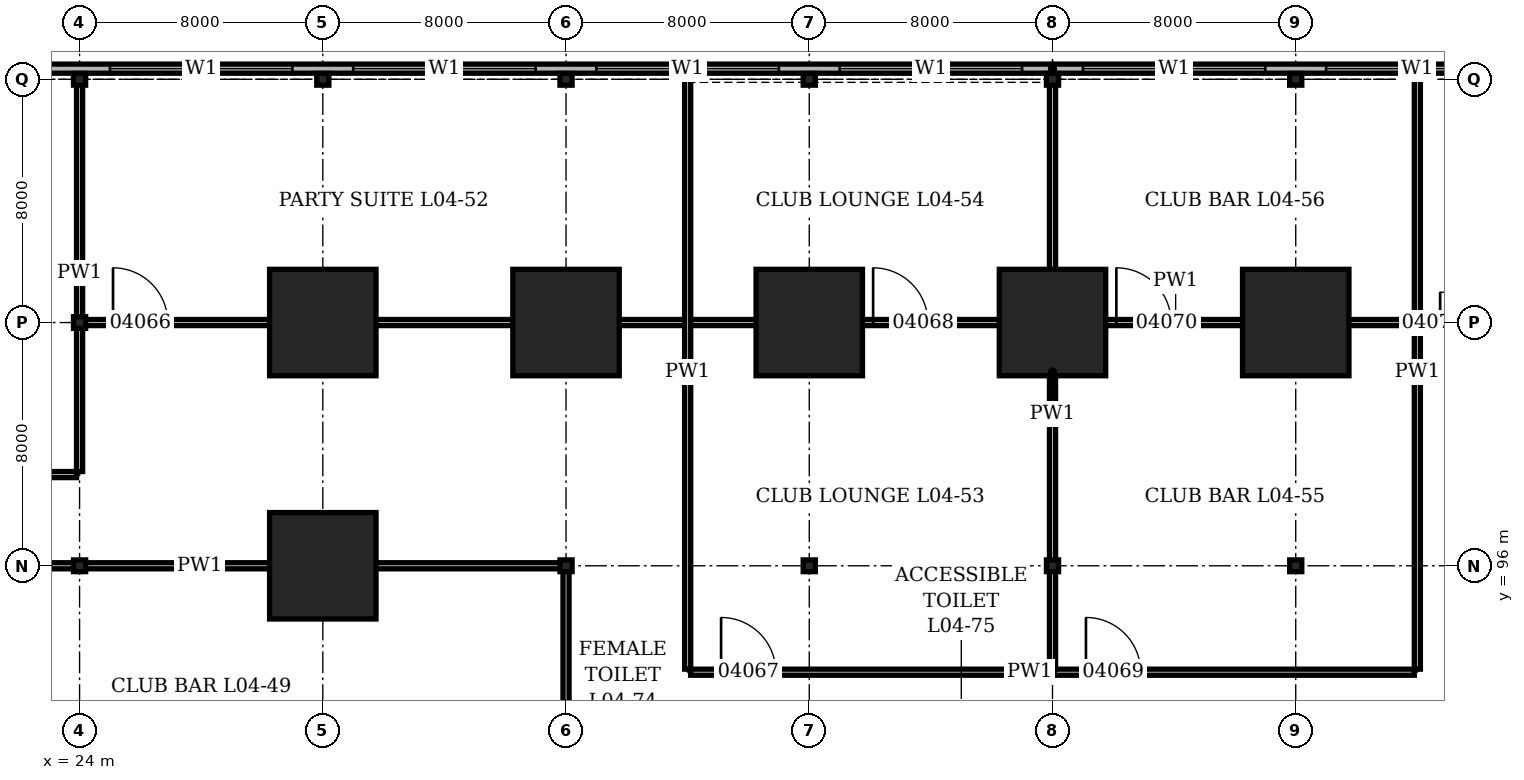
"""IFC4 building model, lengths in metres.
Left out: names, types, materials, properties, quantities, classifications, styles, units other than length and angle.
Written with IfcOpenShell. Run it as: python <this file> out.ifc"""

import sys

from ifc_helpers import new_model, si_unit, direction, frame, frame_2d, origin, origin_2d, place, context, subcontext, project, spatial, rectangle, hollow_rectangle, i_section, extrude, element, fill, save


model = new_model("IFC4")
c1 = context("Model", 3, precision=1e-05, world=origin(), true_north=direction((0.0, 1.0)))
c2 = subcontext(c1, "Body", "Model", "MODEL_VIEW")
j1 = project(units=[si_unit("LENGTHUNIT", "METRE"), si_unit("PLANEANGLEUNIT", "RADIAN")], contexts=[c1])
p1 = place(None, origin())
s1 = spatial("IfcSite", under=j1, at=p1, CompositionType="ELEMENT")
p2 = place(p1, origin())
s2 = spatial("IfcBuilding", under=s1, at=p2, CompositionType="ELEMENT")
p3 = place(p2, frame((0.0, 0.0, 19.9)))
s3 = spatial("IfcBuildingStorey", under=s2, at=p3, CompositionType="ELEMENT", Elevation=19.9)
for number, where, z_axis, x_axis in (
    (1, (24.0, 96.0, 0.0), (0.0, 0.0, 1.0), (1.0, 0.0, 0.0)),
    (2, (24.0, 104.0, 0.0), (0.0, 0.0, 1.0), (1.0, 0.0, 0.0)),
    (3, (24.0, 112.0, 0.0), (0.0, 0.0, 1.0), (1.0, 0.0, 0.0)),
):
    element("IfcColumn", number, at=place(p3, frame(where, z_axis=z_axis, x_axis=x_axis)), inside=s3, PredefinedType="COLUMN", context=c2, shape_type="SweptSolid", body=[
        extrude(i_section(OverallWidth=0.399, OverallDepth=0.386, WebThickness=0.021, FlangeThickness=0.033, at=origin_2d()), origin(), (0.0, 0.0, 1.0), 6.0),
    ])
for number, where, z_axis, x_axis in (
    (4, (32.0, 96.0, 0.0), (0.0, 0.0, 1.0), (1.0, 0.0, 0.0)),
    (5, (32.0, 104.0, 0.0), (0.0, 0.0, 1.0), (1.0, 0.0, 0.0)),
):
    element("IfcColumn", number, at=place(p3, frame(where, z_axis=z_axis, x_axis=x_axis)), inside=s3, PredefinedType="COLUMN", context=c2, shape_type="SweptSolid", body=[
        extrude(hollow_rectangle(XDim=3.5, YDim=3.5, WallThickness=0.5, at=origin_2d()), origin(), (0.0, 0.0, 1.0), 6.0),
    ])
for number, where, z_axis, x_axis in (
    (6, (32.0, 112.0, 0.0), (0.0, 0.0, 1.0), (1.0, 0.0, 0.0)),
    (7, (40.0, 96.0, 0.0), (0.0, 0.0, 1.0), (1.0, 0.0, 0.0)),
):
    element("IfcColumn", number, at=place(p3, frame(where, z_axis=z_axis, x_axis=x_axis)), inside=s3, PredefinedType="COLUMN", context=c2, shape_type="SweptSolid", body=[
        extrude(i_section(OverallWidth=0.399, OverallDepth=0.386, WebThickness=0.021, FlangeThickness=0.033, at=origin_2d()), origin(), (0.0, 0.0, 1.0), 6.0),
    ])
p4 = place(p3, frame((40.0, 104.0, 0.0), z_axis=(0.0, 0.0, 1.0), x_axis=(1.0, 0.0, 0.0)))
e8 = element("IfcColumn", 8, at=p4, inside=s3, PredefinedType="COLUMN", context=c2, shape_type="SweptSolid", body=[
    extrude(hollow_rectangle(XDim=3.5, YDim=3.5, WallThickness=0.5, at=origin_2d()), origin(), (0.0, 0.0, 1.0), 6.0),
])
for number, where, z_axis, x_axis in (
    (9, (40.0, 112.0, 0.0), (0.0, 0.0, 1.0), (1.0, 0.0, 0.0)),
    (10, (48.0, 96.0, 0.0), (0.0, 0.0, 1.0), (1.0, 0.0, 0.0)),
):
    element("IfcColumn", number, at=place(p3, frame(where, z_axis=z_axis, x_axis=x_axis)), inside=s3, PredefinedType="COLUMN", context=c2, shape_type="SweptSolid", body=[
        extrude(i_section(OverallWidth=0.399, OverallDepth=0.386, WebThickness=0.021, FlangeThickness=0.033, at=origin_2d()), origin(), (0.0, 0.0, 1.0), 6.0),
    ])
p5 = place(p3, frame((48.0, 104.0, 0.0), z_axis=(0.0, 0.0, 1.0), x_axis=(1.0, 0.0, 0.0)))
e11 = element("IfcColumn", 11, at=p5, inside=s3, PredefinedType="COLUMN", context=c2, shape_type="SweptSolid", body=[
    extrude(hollow_rectangle(XDim=3.5, YDim=3.5, WallThickness=0.5, at=origin_2d()), origin(), (0.0, 0.0, 1.0), 6.0),
])
for number, where, z_axis, x_axis in (
    (12, (48.0, 112.0, 0.0), (0.0, 0.0, 1.0), (1.0, 0.0, 0.0)),
    (13, (56.0, 96.0, 0.0), (0.0, 0.0, 1.0), (1.0, 0.0, 0.0)),
):
    element("IfcColumn", number, at=place(p3, frame(where, z_axis=z_axis, x_axis=x_axis)), inside=s3, PredefinedType="COLUMN", context=c2, shape_type="SweptSolid", body=[
        extrude(i_section(OverallWidth=0.399, OverallDepth=0.386, WebThickness=0.021, FlangeThickness=0.033, at=origin_2d()), origin(), (0.0, 0.0, 1.0), 6.0),
    ])
p6 = place(p3, frame((56.0, 104.0, 0.0), z_axis=(0.0, 0.0, 1.0), x_axis=(1.0, 0.0, 0.0)))
e14 = element("IfcColumn", 14, at=p6, inside=s3, PredefinedType="COLUMN", context=c2, shape_type="SweptSolid", body=[
    extrude(hollow_rectangle(XDim=3.5, YDim=3.5, WallThickness=0.5, at=origin_2d()), origin(), (0.0, 0.0, 1.0), 6.0),
])
for number, where, z_axis, x_axis in (
    (15, (56.0, 112.0, 0.0), (0.0, 0.0, 1.0), (1.0, 0.0, 0.0)),
    (16, (64.0, 96.0, 0.0), (0.0, 0.0, 1.0), (1.0, 0.0, 0.0)),
):
    element("IfcColumn", number, at=place(p3, frame(where, z_axis=z_axis, x_axis=x_axis)), inside=s3, PredefinedType="COLUMN", context=c2, shape_type="SweptSolid", body=[
        extrude(i_section(OverallWidth=0.399, OverallDepth=0.386, WebThickness=0.021, FlangeThickness=0.033, at=origin_2d()), origin(), (0.0, 0.0, 1.0), 6.0),
    ])
p7 = place(p3, frame((64.0, 104.0, 0.0), z_axis=(0.0, 0.0, 1.0), x_axis=(1.0, 0.0, 0.0)))
e17 = element("IfcColumn", 17, at=p7, inside=s3, PredefinedType="COLUMN", context=c2, shape_type="SweptSolid", body=[
    extrude(hollow_rectangle(XDim=3.5, YDim=3.5, WallThickness=0.5, at=origin_2d()), origin(), (0.0, 0.0, 1.0), 6.0),
])
p8 = place(p3, frame((64.0, 112.0, 0.0), z_axis=(0.0, 0.0, 1.0), x_axis=(1.0, 0.0, 0.0)))
e18 = element("IfcColumn", 18, at=p8, inside=s3, PredefinedType="COLUMN", context=c2, shape_type="SweptSolid", body=[
    extrude(i_section(OverallWidth=0.399, OverallDepth=0.386, WebThickness=0.021, FlangeThickness=0.033, at=origin_2d()), origin(), (0.0, 0.0, 1.0), 6.0),
])
p9 = place(p3, frame((112.35, 112.35, 0.0), z_axis=(0.0, 0.0, 1.0), x_axis=(-1.0, 0.0, 0.0)))
e19 = element("IfcWall", 19, at=p9, inside=s3, PredefinedType="SOLIDWALL", context=c2, shape_type="SweptSolid", body=[
    extrude(rectangle(XDim=112.7, YDim=0.3, at=frame_2d((56.35, 0.0))), origin(), (0.0, 0.0, 1.0), 6.0),
])
p10 = place(p9, frame((1.35, 0.0, 1.0)))
e20 = element("IfcOpeningElement", 20, at=p10, cuts=e19, PredefinedType="OPENING", context=c2, shape_type="SweptSolid", body=[
    extrude(rectangle(XDim=6.0, YDim=1.5, at=frame_2d((3.0, 0.75))), frame((0.0, 0.16, 0.0), z_axis=(0.0, -1.0, 0.0), x_axis=(1.0, 0.0, 0.0)), (0.0, 0.0, 1.0), 0.32),
])
p11 = place(p9, frame((9.35, 0.0, 1.0)))
e21 = element("IfcOpeningElement", 21, at=p11, cuts=e19, PredefinedType="OPENING", context=c2, shape_type="SweptSolid", body=[
    extrude(rectangle(XDim=6.0, YDim=1.5, at=frame_2d((3.0, 0.75))), frame((0.0, 0.16, 0.0), z_axis=(0.0, -1.0, 0.0), x_axis=(1.0, 0.0, 0.0)), (0.0, 0.0, 1.0), 0.32),
])
p12 = place(p9, frame((17.35, 0.0, 1.0)))
e22 = element("IfcOpeningElement", 22, at=p12, cuts=e19, PredefinedType="OPENING", context=c2, shape_type="SweptSolid", body=[
    extrude(rectangle(XDim=6.0, YDim=1.5, at=frame_2d((3.0, 0.75))), frame((0.0, 0.16, 0.0), z_axis=(0.0, -1.0, 0.0), x_axis=(1.0, 0.0, 0.0)), (0.0, 0.0, 1.0), 0.32),
])
p13 = place(p9, frame((25.35, 0.0, 1.0)))
e23 = element("IfcOpeningElement", 23, at=p13, cuts=e19, PredefinedType="OPENING", context=c2, shape_type="SweptSolid", body=[
    extrude(rectangle(XDim=6.0, YDim=1.5, at=frame_2d((3.0, 0.75))), frame((0.0, 0.16, 0.0), z_axis=(0.0, -1.0, 0.0), x_axis=(1.0, 0.0, 0.0)), (0.0, 0.0, 1.0), 0.32),
])
p14 = place(p9, frame((33.35, 0.0, 1.0)))
e24 = element("IfcOpeningElement", 24, at=p14, cuts=e19, PredefinedType="OPENING", context=c2, shape_type="SweptSolid", body=[
    extrude(rectangle(XDim=6.0, YDim=1.5, at=frame_2d((3.0, 0.75))), frame((0.0, 0.16, 0.0), z_axis=(0.0, -1.0, 0.0), x_axis=(1.0, 0.0, 0.0)), (0.0, 0.0, 1.0), 0.32),
])
p15 = place(p9, frame((41.35, 0.0, 1.0)))
e25 = element("IfcOpeningElement", 25, at=p15, cuts=e19, PredefinedType="OPENING", context=c2, shape_type="SweptSolid", body=[
    extrude(rectangle(XDim=6.0, YDim=1.5, at=frame_2d((3.0, 0.75))), frame((0.0, 0.16, 0.0), z_axis=(0.0, -1.0, 0.0), x_axis=(1.0, 0.0, 0.0)), (0.0, 0.0, 1.0), 0.32),
])
p16 = place(p9, frame((49.35, 0.0, 1.0)))
e26 = element("IfcOpeningElement", 26, at=p16, cuts=e19, PredefinedType="OPENING", context=c2, shape_type="SweptSolid", body=[
    extrude(rectangle(XDim=6.0, YDim=1.5, at=frame_2d((3.0, 0.75))), frame((0.0, 0.16, 0.0), z_axis=(0.0, -1.0, 0.0), x_axis=(1.0, 0.0, 0.0)), (0.0, 0.0, 1.0), 0.32),
])
p17 = place(p9, frame((57.35, 0.0, 1.0)))
e27 = element("IfcOpeningElement", 27, at=p17, cuts=e19, PredefinedType="OPENING", context=c2, shape_type="SweptSolid", body=[
    extrude(rectangle(XDim=6.0, YDim=1.5, at=frame_2d((3.0, 0.75))), frame((0.0, 0.16, 0.0), z_axis=(0.0, -1.0, 0.0), x_axis=(1.0, 0.0, 0.0)), (0.0, 0.0, 1.0), 0.32),
])
p18 = place(p9, frame((65.35, 0.0, 1.0)))
e28 = element("IfcOpeningElement", 28, at=p18, cuts=e19, PredefinedType="OPENING", context=c2, shape_type="SweptSolid", body=[
    extrude(rectangle(XDim=6.0, YDim=1.5, at=frame_2d((3.0, 0.75))), frame((0.0, 0.16, 0.0), z_axis=(0.0, -1.0, 0.0), x_axis=(1.0, 0.0, 0.0)), (0.0, 0.0, 1.0), 0.32),
])
p19 = place(p9, frame((73.35, 0.0, 1.0)))
e29 = element("IfcOpeningElement", 29, at=p19, cuts=e19, PredefinedType="OPENING", context=c2, shape_type="SweptSolid", body=[
    extrude(rectangle(XDim=6.0, YDim=1.5, at=frame_2d((3.0, 0.75))), frame((0.0, 0.16, 0.0), z_axis=(0.0, -1.0, 0.0), x_axis=(1.0, 0.0, 0.0)), (0.0, 0.0, 1.0), 0.32),
])
p20 = place(p9, frame((81.35, 0.0, 1.0)))
e30 = element("IfcOpeningElement", 30, at=p20, cuts=e19, PredefinedType="OPENING", context=c2, shape_type="SweptSolid", body=[
    extrude(rectangle(XDim=6.0, YDim=1.5, at=frame_2d((3.0, 0.75))), frame((0.0, 0.16, 0.0), z_axis=(0.0, -1.0, 0.0), x_axis=(1.0, 0.0, 0.0)), (0.0, 0.0, 1.0), 0.32),
])
p21 = place(p9, frame((89.35, 0.0, 1.0)))
e31 = element("IfcOpeningElement", 31, at=p21, cuts=e19, PredefinedType="OPENING", context=c2, shape_type="SweptSolid", body=[
    extrude(rectangle(XDim=6.0, YDim=1.5, at=frame_2d((3.0, 0.75))), frame((0.0, 0.16, 0.0), z_axis=(0.0, -1.0, 0.0), x_axis=(1.0, 0.0, 0.0)), (0.0, 0.0, 1.0), 0.32),
])
p22 = place(p9, frame((97.35, 0.0, 1.0)))
e32 = element("IfcOpeningElement", 32, at=p22, cuts=e19, PredefinedType="OPENING", context=c2, shape_type="SweptSolid", body=[
    extrude(rectangle(XDim=6.0, YDim=1.5, at=frame_2d((3.0, 0.75))), frame((0.0, 0.16, 0.0), z_axis=(0.0, -1.0, 0.0), x_axis=(1.0, 0.0, 0.0)), (0.0, 0.0, 1.0), 0.32),
])
p23 = place(p9, frame((105.35, 0.0, 1.0)))
e33 = element("IfcOpeningElement", 33, at=p23, cuts=e19, PredefinedType="OPENING", context=c2, shape_type="SweptSolid", body=[
    extrude(rectangle(XDim=6.0, YDim=1.5, at=frame_2d((3.0, 0.75))), frame((0.0, 0.16, 0.0), z_axis=(0.0, -1.0, 0.0), x_axis=(1.0, 0.0, 0.0)), (0.0, 0.0, 1.0), 0.32),
])
p24 = place(p3, frame((44.1, 92.5, 0.0), z_axis=(0.0, 0.0, 1.0), x_axis=(1.0, 0.0, 0.0)))
e34 = element("IfcWall", 34, at=p24, inside=s3, PredefinedType="PARTITIONING", context=c2, shape_type="SweptSolid", body=[
    extrude(rectangle(XDim=23.8, YDim=0.2, at=frame_2d((11.9, 0.0))), origin(), (0.0, 0.0, 1.0), 5.75),
])
p25 = place(p24, frame((1.0, 0.0, 0.0)))
e35 = element("IfcOpeningElement", 35, at=p25, cuts=e34, PredefinedType="OPENING", context=c2, shape_type="SweptSolid", body=[
    extrude(rectangle(XDim=1.8, YDim=2.4, at=frame_2d((0.9, 1.2))), frame((0.0, 0.11, 0.0), z_axis=(0.0, -1.0, 0.0), x_axis=(1.0, 0.0, 0.0)), (0.0, 0.0, 1.0), 0.22),
])
p26 = place(p24, frame((13.0, 0.0, 0.0)))
e36 = element("IfcOpeningElement", 36, at=p26, cuts=e34, PredefinedType="OPENING", context=c2, shape_type="SweptSolid", body=[
    extrude(rectangle(XDim=1.8, YDim=2.4, at=frame_2d((0.9, 1.2))), frame((0.0, 0.11, 0.0), z_axis=(0.0, -1.0, 0.0), x_axis=(1.0, 0.0, 0.0)), (0.0, 0.0, 1.0), 0.22),
])
p27 = place(p3, frame((16.0, 96.0, 0.0), z_axis=(0.0, 0.0, 1.0), x_axis=(1.0, 0.0, 0.0)))
e37 = element("IfcWall", 37, at=p27, inside=s3, PredefinedType="PARTITIONING", context=c2, shape_type="SweptSolid", body=[
    extrude(rectangle(XDim=23.9, YDim=0.2, at=frame_2d((11.95, 0.0))), origin(), (0.0, 0.0, 1.0), 4.978),
])
p28 = place(p3, frame((12.95, 99.0, 0.0), z_axis=(0.0, 0.0, 1.0), x_axis=(1.0, 0.0, 0.0)))
e38 = element("IfcWall", 38, at=p28, inside=s3, PredefinedType="PARTITIONING", context=c2, shape_type="SweptSolid", body=[
    extrude(rectangle(XDim=10.95, YDim=0.2, at=frame_2d((5.475, 0.0))), origin(), (0.0, 0.0, 1.0), 5.75),
])
p29 = place(p28, frame((1.0, 0.0, 0.0)))
e39 = element("IfcOpeningElement", 39, at=p29, cuts=e38, PredefinedType="OPENING", context=c2, shape_type="SweptSolid", body=[
    extrude(rectangle(XDim=1.8, YDim=2.4, at=frame_2d((0.9, 1.2))), frame((0.0, 0.11, 0.0), z_axis=(0.0, -1.0, 0.0), x_axis=(1.0, 0.0, 0.0)), (0.0, 0.0, 1.0), 0.22),
])
p30 = place(p3, frame((24.1, 104.0, 0.0), z_axis=(0.0, 0.0, 1.0), x_axis=(1.0, 0.0, 0.0)))
e40 = element("IfcWall", 40, at=p30, inside=s3, PredefinedType="PARTITIONING", context=c2, shape_type="SweptSolid", body=[
    extrude(rectangle(XDim=71.9, YDim=0.2, at=frame_2d((35.95, 0.0))), origin(), (0.0, 0.0, 1.0), 4.978),
])
p31 = place(p30, frame((1.0, 0.0, 0.0)))
e41 = element("IfcOpeningElement", 41, at=p31, cuts=e40, PredefinedType="OPENING", context=c2, shape_type="SweptSolid", body=[
    extrude(rectangle(XDim=1.8, YDim=2.4, at=frame_2d((0.9, 1.2))), frame((0.0, 0.11, 0.0), z_axis=(0.0, -1.0, 0.0), x_axis=(1.0, 0.0, 0.0)), (0.0, 0.0, 1.0), 0.22),
])
p32 = place(p30, frame((26.0, 0.0, 0.0)))
e42 = element("IfcOpeningElement", 42, at=p32, cuts=e40, PredefinedType="OPENING", context=c2, shape_type="SweptSolid", body=[
    extrude(rectangle(XDim=1.8, YDim=2.4, at=frame_2d((0.9, 1.2))), frame((0.0, 0.11, 0.0), z_axis=(0.0, -1.0, 0.0), x_axis=(1.0, 0.0, 0.0)), (0.0, 0.0, 1.0), 0.22),
])
p33 = place(p30, frame((34.0, 0.0, 0.0)))
e43 = element("IfcOpeningElement", 43, at=p33, cuts=e40, PredefinedType="OPENING", context=c2, shape_type="SweptSolid", body=[
    extrude(rectangle(XDim=1.8, YDim=2.4, at=frame_2d((0.9, 1.2))), frame((0.0, 0.11, 0.0), z_axis=(0.0, -1.0, 0.0), x_axis=(1.0, 0.0, 0.0)), (0.0, 0.0, 1.0), 0.22),
])
p34 = place(p30, frame((44.65, 0.0, 0.0)))
e44 = element("IfcOpeningElement", 44, at=p34, cuts=e40, PredefinedType="OPENING", context=c2, shape_type="SweptSolid", body=[
    extrude(rectangle(XDim=1.0, YDim=2.1, at=frame_2d((0.5, 1.05))), frame((0.0, 0.11, 0.0), z_axis=(0.0, -1.0, 0.0), x_axis=(1.0, 0.0, 0.0)), (0.0, 0.0, 1.0), 0.22),
])
p35 = place(p3, frame((24.0, 99.1, 0.0), z_axis=(0.0, 0.0, 1.0), x_axis=(0.0, 1.0, 0.0)))
e45 = element("IfcWall", 45, at=p35, inside=s3, PredefinedType="PARTITIONING", context=c2, shape_type="SweptSolid", body=[
    extrude(rectangle(XDim=13.05, YDim=0.2, at=frame_2d((6.525, 0.0))), origin(), (0.0, 0.0, 1.0), 4.978),
])
p36 = place(p3, frame((40.0, 72.1, 0.0), z_axis=(0.0, 0.0, 1.0), x_axis=(0.0, 1.0, 0.0)))
e46 = element("IfcWall", 46, at=p36, inside=s3, PredefinedType="PARTITIONING", context=c2, shape_type="SweptSolid", body=[
    extrude(rectangle(XDim=23.8, YDim=0.2, at=frame_2d((11.9, 0.0))), origin(), (0.0, 0.0, 1.0), 4.978),
])
p37 = place(p36, frame((17.0, 0.0, 0.0)))
e47 = element("IfcOpeningElement", 47, at=p37, cuts=e46, PredefinedType="OPENING", context=c2, shape_type="SweptSolid", body=[
    extrude(rectangle(XDim=1.8, YDim=2.4, at=frame_2d((0.9, 1.2))), frame((0.0, 0.11, 0.0), z_axis=(0.0, -1.0, 0.0), x_axis=(1.0, 0.0, 0.0)), (0.0, 0.0, 1.0), 0.22),
])
p38 = place(p3, frame((44.0, 92.6, 0.0), z_axis=(0.0, 0.0, 1.0), x_axis=(0.0, 1.0, 0.0)))
e48 = element("IfcWall", 48, at=p38, inside=s3, PredefinedType="PARTITIONING", context=c2, shape_type="SweptSolid", body=[
    extrude(rectangle(XDim=19.55, YDim=0.2, at=frame_2d((9.775, 0.0))), origin(), (0.0, 0.0, 1.0), 5.75),
])
p39 = place(p3, frame((56.0, 92.6, 0.0), z_axis=(0.0, 0.0, 1.0), x_axis=(0.0, 1.0, 0.0)))
e49 = element("IfcWall", 49, at=p39, inside=s3, PredefinedType="PARTITIONING", context=c2, shape_type="SweptSolid", body=[
    extrude(rectangle(XDim=19.55, YDim=0.2, at=frame_2d((9.775, 0.0))), origin(), (0.0, 0.0, 1.0), 4.978),
])
p40 = place(p3, frame((68.0, 92.6, 0.0), z_axis=(0.0, 0.0, 1.0), x_axis=(0.0, 1.0, 0.0)))
e50 = element("IfcWall", 50, at=p40, inside=s3, PredefinedType="PARTITIONING", context=c2, shape_type="SweptSolid", body=[
    extrude(rectangle(XDim=19.55, YDim=0.2, at=frame_2d((9.775, 0.0))), origin(), (0.0, 0.0, 1.0), 5.75),
])
p41 = place(p15, origin())
e51 = element("IfcWindow", 51, at=p41, inside=s3, PartitioningType="SINGLE_PANEL", PredefinedType="WINDOW", context=c2, shape_type="SweptSolid", body=[
    extrude(rectangle(XDim=6.0, YDim=1.5, at=frame_2d((3.0, 0.75))), frame((0.0, 0.03, 0.0), z_axis=(0.0, -1.0, 0.0), x_axis=(1.0, 0.0, 0.0)), (0.0, 0.0, 1.0), 0.06),
])
fill(e25, e51)
p42 = place(p16, origin())
e52 = element("IfcWindow", 52, at=p42, inside=s3, PartitioningType="SINGLE_PANEL", PredefinedType="WINDOW", context=c2, shape_type="SweptSolid", body=[
    extrude(rectangle(XDim=6.0, YDim=1.5, at=frame_2d((3.0, 0.75))), frame((0.0, 0.03, 0.0), z_axis=(0.0, -1.0, 0.0), x_axis=(1.0, 0.0, 0.0)), (0.0, 0.0, 1.0), 0.06),
])
fill(e26, e52)
p43 = place(p17, origin())
e53 = element("IfcWindow", 53, at=p43, inside=s3, PartitioningType="SINGLE_PANEL", PredefinedType="WINDOW", context=c2, shape_type="SweptSolid", body=[
    extrude(rectangle(XDim=6.0, YDim=1.5, at=frame_2d((3.0, 0.75))), frame((0.0, 0.03, 0.0), z_axis=(0.0, -1.0, 0.0), x_axis=(1.0, 0.0, 0.0)), (0.0, 0.0, 1.0), 0.06),
])
fill(e27, e53)
p44 = place(p18, origin())
e54 = element("IfcWindow", 54, at=p44, inside=s3, PartitioningType="SINGLE_PANEL", PredefinedType="WINDOW", context=c2, shape_type="SweptSolid", body=[
    extrude(rectangle(XDim=6.0, YDim=1.5, at=frame_2d((3.0, 0.75))), frame((0.0, 0.03, 0.0), z_axis=(0.0, -1.0, 0.0), x_axis=(1.0, 0.0, 0.0)), (0.0, 0.0, 1.0), 0.06),
])
fill(e28, e54)
p45 = place(p19, origin())
e55 = element("IfcWindow", 55, at=p45, inside=s3, PartitioningType="SINGLE_PANEL", PredefinedType="WINDOW", context=c2, shape_type="SweptSolid", body=[
    extrude(rectangle(XDim=6.0, YDim=1.5, at=frame_2d((3.0, 0.75))), frame((0.0, 0.03, 0.0), z_axis=(0.0, -1.0, 0.0), x_axis=(1.0, 0.0, 0.0)), (0.0, 0.0, 1.0), 0.06),
])
fill(e29, e55)
p46 = place(p20, origin())
e56 = element("IfcWindow", 56, at=p46, inside=s3, PartitioningType="SINGLE_PANEL", PredefinedType="WINDOW", context=c2, shape_type="SweptSolid", body=[
    extrude(rectangle(XDim=6.0, YDim=1.5, at=frame_2d((3.0, 0.75))), frame((0.0, 0.03, 0.0), z_axis=(0.0, -1.0, 0.0), x_axis=(1.0, 0.0, 0.0)), (0.0, 0.0, 1.0), 0.06),
])
fill(e30, e56)
p47 = place(p31, origin())
e57 = element("IfcDoor", 57, at=p47, inside=s3, OperationType="DOUBLE_DOOR_DOUBLE_SWING", PredefinedType="DOOR", context=c2, shape_type="SweptSolid", body=[
    extrude(rectangle(XDim=1.8, YDim=2.4, at=frame_2d((0.9, 1.2))), frame((0.0, 0.1, 0.0), z_axis=(0.0, -1.0, 0.0), x_axis=(1.0, 0.0, 0.0)), (0.0, 0.0, 1.0), 0.199),
])
fill(e41, e57)
p48 = place(p25, origin())
e58 = element("IfcDoor", 58, at=p48, inside=s3, OperationType="DOUBLE_DOOR_DOUBLE_SWING", PredefinedType="DOOR", context=c2, shape_type="SweptSolid", body=[
    extrude(rectangle(XDim=1.8, YDim=2.4, at=frame_2d((0.9, 1.2))), frame((0.0, 0.1, 0.0), z_axis=(0.0, -1.0, 0.0), x_axis=(1.0, 0.0, 0.0)), (0.0, 0.0, 1.0), 0.199),
])
fill(e35, e58)
p49 = place(p32, origin())
e59 = element("IfcDoor", 59, at=p49, inside=s3, OperationType="DOUBLE_DOOR_DOUBLE_SWING", PredefinedType="DOOR", context=c2, shape_type="SweptSolid", body=[
    extrude(rectangle(XDim=1.8, YDim=2.4, at=frame_2d((0.9, 1.2))), frame((0.0, 0.1, 0.0), z_axis=(0.0, -1.0, 0.0), x_axis=(1.0, 0.0, 0.0)), (0.0, 0.0, 1.0), 0.199),
])
fill(e42, e59)
p50 = place(p26, origin())
e60 = element("IfcDoor", 60, at=p50, inside=s3, OperationType="DOUBLE_DOOR_DOUBLE_SWING", PredefinedType="DOOR", context=c2, shape_type="SweptSolid", body=[
    extrude(rectangle(XDim=1.8, YDim=2.4, at=frame_2d((0.9, 1.2))), frame((0.0, 0.1, 0.0), z_axis=(0.0, -1.0, 0.0), x_axis=(1.0, 0.0, 0.0)), (0.0, 0.0, 1.0), 0.199),
])
fill(e36, e60)
p51 = place(p33, origin())
e61 = element("IfcDoor", 61, at=p51, inside=s3, OperationType="DOUBLE_DOOR_DOUBLE_SWING", PredefinedType="DOOR", context=c2, shape_type="SweptSolid", body=[
    extrude(rectangle(XDim=1.8, YDim=2.4, at=frame_2d((0.9, 1.2))), frame((0.0, 0.1, 0.0), z_axis=(0.0, -1.0, 0.0), x_axis=(1.0, 0.0, 0.0)), (0.0, 0.0, 1.0), 0.199),
])
fill(e43, e61)
p52 = place(p34, origin())
e62 = element("IfcDoor", 62, at=p52, inside=s3, OperationType="SINGLE_SWING_LEFT", PredefinedType="DOOR", context=c2, shape_type="SweptSolid", body=[
    extrude(rectangle(XDim=1.0, YDim=2.1, at=frame_2d((0.5, 1.05))), frame((0.0, 0.1, 0.0), z_axis=(0.0, -1.0, 0.0), x_axis=(1.0, 0.0, 0.0)), (0.0, 0.0, 1.0), 0.199),
])
fill(e44, e62)
save(model, sys.argv[1])
